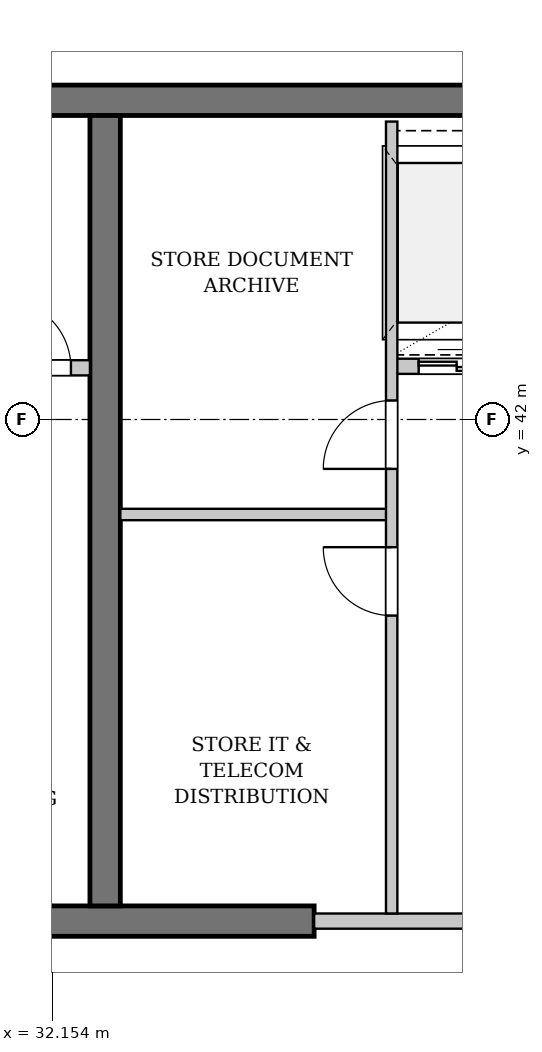
"""IFC4 building model, lengths in metres.
Left out: names, types, materials, properties, quantities, classifications, styles, units other than length and angle.
Written with IfcOpenShell. Run it as: python <this file> out.ifc"""

import sys

from ifc_helpers import new_model, si_unit, direction, frame, frame_2d, origin, place, context, subcontext, project, spatial, rectangle, extrude, element, fill, save


model = new_model("IFC4")
c1 = context("Model", 3, precision=1e-05, world=origin(), true_north=direction((0.0, 1.0)))
c2 = subcontext(c1, "Body", "Model", "MODEL_VIEW")
j1 = project(units=[si_unit("LENGTHUNIT", "METRE"), si_unit("PLANEANGLEUNIT", "RADIAN")], contexts=[c1])
p1 = place(None, origin())
s1 = spatial("IfcSite", under=j1, at=p1, CompositionType="ELEMENT")
p2 = place(p1, origin())
s2 = spatial("IfcBuilding", under=s1, at=p2, CompositionType="ELEMENT")
p3 = place(p2, frame((0.0, 0.0, 255.2)))
s3 = spatial("IfcBuildingStorey", under=s2, at=p3, CompositionType="ELEMENT", Elevation=255.2)
p4 = place(p3, frame((22.84, 46.2, 0.0), z_axis=(0.0, 0.0, 1.0), x_axis=(1.0, 0.0, 0.0)))
e1 = element("IfcWall", 1, at=p4, inside=s3, PredefinedType="SHEAR", context=c2, shape_type="SweptSolid", body=[
    extrude(rectangle(XDim=31.12, YDim=0.4, at=frame_2d((15.56, 0.0))), origin(), (0.0, 0.0, 1.0), 3.48),
])
p5 = place(p3, frame((30.72, 35.4, 0.0), z_axis=(0.0, 0.0, 1.0), x_axis=(1.0, 0.0, 0.0)))
e2 = element("IfcWall", 2, at=p5, inside=s3, PredefinedType="SHEAR", context=c2, shape_type="SweptSolid", body=[
    extrude(rectangle(XDim=4.88, YDim=0.4, at=frame_2d((2.44, 0.0))), origin(), (0.0, 0.0, 1.0), 3.48),
])
p6 = place(p3, frame((32.85, 35.6, 0.0), z_axis=(0.0, 0.0, 1.0), x_axis=(0.0, 1.0, 0.0)))
e3 = element("IfcWall", 3, at=p6, inside=s3, PredefinedType="SHEAR", context=c2, shape_type="SweptSolid", body=[
    extrude(rectangle(XDim=10.4, YDim=0.4, at=frame_2d((5.2, 0.0))), origin(), (0.0, 0.0, 1.0), 3.48),
])
p7 = place(p3, frame((27.32, 42.68, 0.0), z_axis=(0.0, 0.0, 1.0), x_axis=(1.0, 0.0, 0.0)))
e4 = element("IfcWall", 4, at=p7, inside=s3, PredefinedType="PARTITIONING", context=c2, shape_type="SweptSolid", body=[
    extrude(rectangle(XDim=5.33, YDim=0.2, at=frame_2d((2.665, 0.0))), origin(), (0.0, 0.0, 1.0), 3.48),
])
p8 = place(p7, frame((4.18, 0.0, 0.0)))
e5 = element("IfcOpeningElement", 5, at=p8, cuts=e4, PredefinedType="OPENING", context=c2, shape_type="SweptSolid", body=[
    extrude(rectangle(XDim=0.9, YDim=2.15, at=frame_2d((0.45, 1.075))), frame((0.0, 0.11, 0.0), z_axis=(0.0, -1.0, 0.0), x_axis=(1.0, 0.0, 0.0)), (0.0, 0.0, 1.0), 0.22),
])
p9 = place(p3, frame((35.6, 35.4, 0.0), z_axis=(0.0, 0.0, 1.0), x_axis=(1.0, 0.0, 0.0)))
e6 = element("IfcWall", 6, at=p9, inside=s3, PredefinedType="PARTITIONING", context=c2, shape_type="SweptSolid", body=[
    extrude(rectangle(XDim=6.5, YDim=0.2, at=frame_2d((3.25, 0.0))), origin(), (0.0, 0.0, 1.0), 2.275),
])
p10 = place(p9, frame((3.8, 0.0, 0.0)))
e7 = element("IfcOpeningElement", 7, at=p10, cuts=e6, PredefinedType="OPENING", context=c2, shape_type="SweptSolid", body=[
    extrude(rectangle(XDim=1.8, YDim=2.3, at=frame_2d((0.9, 1.15))), frame((0.0, 0.11, 0.0), z_axis=(0.0, -1.0, 0.0), x_axis=(1.0, 0.0, 0.0)), (0.0, 0.0, 1.0), 0.22),
])
p11 = place(p3, frame((36.6, 42.7, 0.0), z_axis=(0.0, 0.0, 1.0), x_axis=(1.0, 0.0, 0.0)))
e8 = element("IfcWall", 8, at=p11, inside=s3, PredefinedType="PARTITIONING", context=c2, shape_type="SweptSolid", body=[
    extrude(rectangle(XDim=5.25, YDim=0.2, at=frame_2d((2.625, 0.0))), origin(), (0.0, 0.0, 1.0), 3.48),
])
p12 = place(p11, frame((0.375, 0.0, 0.0)))
e9 = element("IfcOpeningElement", 9, at=p12, cuts=e8, PredefinedType="OPENING", context=c2, shape_type="SweptSolid", body=[
    extrude(rectangle(XDim=1.0, YDim=2.2, at=frame_2d((0.5, 1.1))), frame((0.0, 0.11, 0.0), z_axis=(0.0, -1.0, 0.0), x_axis=(1.0, 0.0, 0.0)), (0.0, 0.0, 1.0), 0.22),
])
p13 = place(p11, frame((2.125, 0.0, 0.0)))
e10 = element("IfcOpeningElement", 10, at=p13, cuts=e8, PredefinedType="OPENING", context=c2, shape_type="SweptSolid", body=[
    extrude(rectangle(XDim=1.0, YDim=2.2, at=frame_2d((0.5, 1.1))), frame((0.0, 0.11, 0.0), z_axis=(0.0, -1.0, 0.0), x_axis=(1.0, 0.0, 0.0)), (0.0, 0.0, 1.0), 0.22),
])
p14 = place(p11, frame((3.875, 0.0, 0.0)))
e11 = element("IfcOpeningElement", 11, at=p14, cuts=e8, PredefinedType="OPENING", context=c2, shape_type="SweptSolid", body=[
    extrude(rectangle(XDim=1.0, YDim=2.2, at=frame_2d((0.5, 1.1))), frame((0.0, 0.11, 0.0), z_axis=(0.0, -1.0, 0.0), x_axis=(1.0, 0.0, 0.0)), (0.0, 0.0, 1.0), 0.22),
])
p15 = place(p3, frame((33.05, 40.75, 0.0), z_axis=(0.0, 0.0, 1.0), x_axis=(1.0, 0.0, 0.0)))
e12 = element("IfcWall", 12, at=p15, inside=s3, PredefinedType="PARTITIONING", context=c2, shape_type="SweptSolid", body=[
    extrude(rectangle(XDim=3.57, YDim=0.15, at=frame_2d((1.785, 0.0))), origin(), (0.0, 0.0, 1.0), 3.48),
])
p16 = place(p3, frame((36.62, 35.5, 0.0), z_axis=(0.0, 0.0, 1.0), x_axis=(0.0, 1.0, 0.0)))
e13 = element("IfcWall", 13, at=p16, inside=s3, PredefinedType="PARTITIONING", context=c2, shape_type="SweptSolid", body=[
    extrude(rectangle(XDim=10.42, YDim=0.15, at=frame_2d((5.21, 0.0))), origin(), (0.0, 0.0, 1.0), 3.48),
])
p17 = place(p16, frame((3.92, 0.0, 0.0)))
e14 = element("IfcOpeningElement", 14, at=p17, cuts=e13, PredefinedType="OPENING", context=c2, shape_type="SweptSolid", body=[
    extrude(rectangle(XDim=0.9, YDim=2.15, at=frame_2d((0.45, 1.075))), frame((0.0, 0.085, 0.0), z_axis=(0.0, -1.0, 0.0), x_axis=(1.0, 0.0, 0.0)), (0.0, 0.0, 1.0), 0.17),
])
p18 = place(p16, frame((5.85, 0.0, 0.0)))
e15 = element("IfcOpeningElement", 15, at=p18, cuts=e13, PredefinedType="OPENING", context=c2, shape_type="SweptSolid", body=[
    extrude(rectangle(XDim=0.9, YDim=2.15, at=frame_2d((0.45, 1.075))), frame((0.0, 0.085, 0.0), z_axis=(0.0, -1.0, 0.0), x_axis=(1.0, 0.0, 0.0)), (0.0, 0.0, 1.0), 0.17),
])
p19 = place(p8, origin())
e16 = element("IfcDoor", 16, at=p19, inside=s3, OperationType="SINGLE_SWING_LEFT", PredefinedType="DOOR", context=c2, shape_type="SweptSolid", body=[
    extrude(rectangle(XDim=0.9, YDim=2.15, at=frame_2d((0.45, 1.075))), frame((0.0, 0.025, 0.0), z_axis=(0.0, -1.0, 0.0), x_axis=(1.0, 0.0, 0.0)), (0.0, 0.0, 1.0), 0.05),
])
fill(e5, e16)
p20 = place(p12, origin())
e17 = element("IfcDoor", 17, at=p20, inside=s3, OperationType="DOUBLE_DOOR_SLIDING", PredefinedType="DOOR", context=c2, shape_type="SweptSolid", body=[
    extrude(rectangle(XDim=1.0, YDim=2.2, at=frame_2d((0.5, 1.1))), frame((0.0, 0.025, 0.0), z_axis=(0.0, -1.0, 0.0), x_axis=(1.0, 0.0, 0.0)), (0.0, 0.0, 1.0), 0.05),
])
fill(e9, e17)
p21 = place(p17, origin())
e18 = element("IfcDoor", 18, at=p21, inside=s3, OperationType="SINGLE_SWING_RIGHT", PredefinedType="DOOR", context=c2, shape_type="SweptSolid", body=[
    extrude(rectangle(XDim=0.9, YDim=2.15, at=frame_2d((0.45, 1.075))), frame((0.0, 0.025, 0.0), z_axis=(0.0, -1.0, 0.0), x_axis=(1.0, 0.0, 0.0)), (0.0, 0.0, 1.0), 0.05),
])
fill(e14, e18)
p22 = place(p18, origin())
e19 = element("IfcDoor", 19, at=p22, inside=s3, OperationType="SINGLE_SWING_LEFT", PredefinedType="DOOR", context=c2, shape_type="SweptSolid", body=[
    extrude(rectangle(XDim=0.9, YDim=2.15, at=frame_2d((0.45, 1.075))), frame((0.0, 0.025, 0.0), z_axis=(0.0, -1.0, 0.0), x_axis=(1.0, 0.0, 0.0)), (0.0, 0.0, 1.0), 0.05),
])
fill(e15, e19)
save(model, sys.argv[1])
